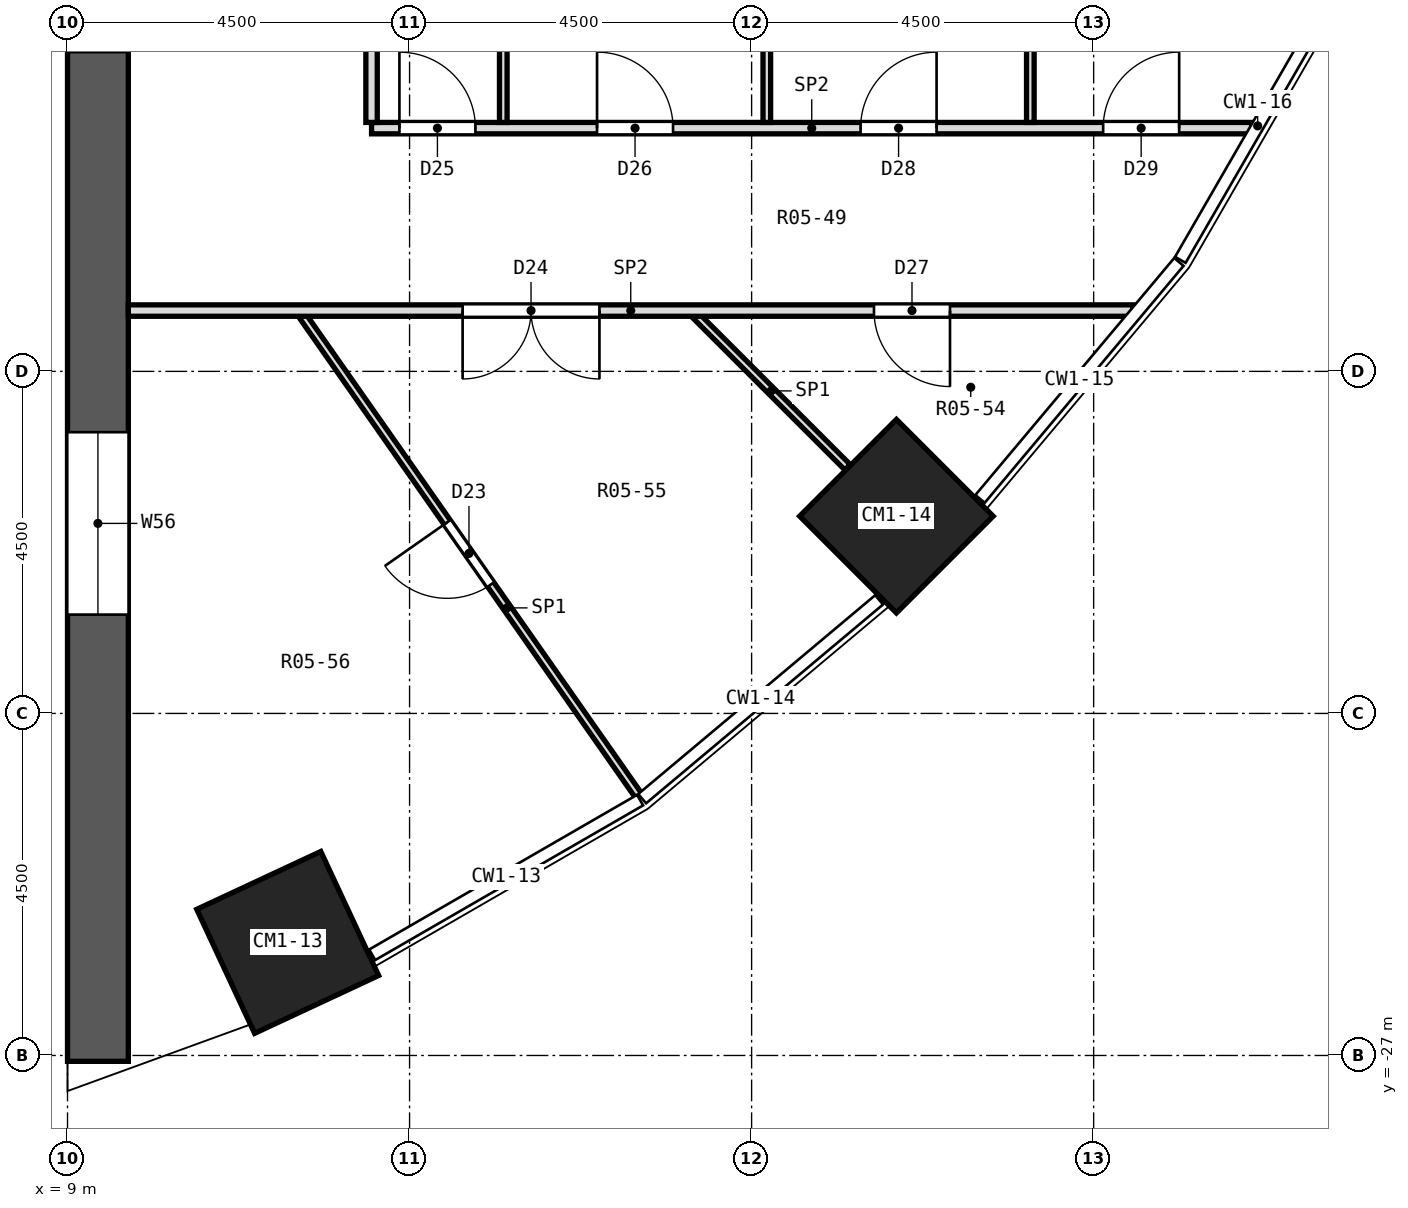
"""IFC4 building model, lengths in metres.
Left out: names, types, materials, properties, quantities, classifications, styles, units other than length and angle.
Written with IfcOpenShell. Run it as: python <this file> out.ifc"""

import sys

from ifc_helpers import new_model, si_unit, direction, frame, frame_2d, origin, origin_2d, place, context, subcontext, project, spatial, polyline, rectangle, outline, extrude, element, fill, save


model = new_model("IFC4")
c1 = context("Model", 3, precision=1e-05, world=origin(), true_north=direction((0.0, 1.0)))
c2 = subcontext(c1, "Body", "Model", "MODEL_VIEW")
j1 = project(units=[si_unit("LENGTHUNIT", "METRE"), si_unit("PLANEANGLEUNIT", "RADIAN")], contexts=[c1])
p1 = place(None, origin())
s1 = spatial("IfcSite", under=j1, at=p1, CompositionType="ELEMENT")
p2 = place(p1, origin())
s2 = spatial("IfcBuilding", under=s1, at=p2, CompositionType="ELEMENT")
p3 = place(p2, frame((0.0, 0.0, 9.2)))
s3 = spatial("IfcBuildingStorey", under=s2, at=p3, CompositionType="ELEMENT", Elevation=9.2)
for number, where, z_axis, x_axis in (
    (1, (11.897, -25.512, 0.0), (0.0, 0.0, 1.0), (0.423, -0.906, 0.0)),
    (2, (19.905, -19.905, 0.0), (0.0, 0.0, 1.0), (0.707, -0.707, 0.0)),
):
    element("IfcColumn", number, at=place(p3, frame(where, z_axis=z_axis, x_axis=x_axis)), inside=s3, PredefinedType="COLUMN", context=c2, shape_type="SweptSolid", body=[
        extrude(rectangle(XDim=1.8, YDim=1.8, at=origin_2d()), origin(), (0.0, 0.0, 1.0), 4.2),
    ])
p4 = place(p3, frame((9.4, -27.077, 0.0), z_axis=(0.0, 0.0, 1.0), x_axis=(0.0, 1.0, 0.0)))
e3 = element("IfcWall", 3, at=p4, inside=s3, PredefinedType="SHEAR", context=c2, shape_type="SweptSolid", body=[
    extrude(rectangle(XDim=54.154, YDim=0.8, at=frame_2d((27.077, 0.0))), origin(), (0.0, 0.0, 1.0), 4.2),
])
p5 = place(p4, frame((13.277, 0.0, 0.9)))
e4 = element("IfcOpeningElement", 4, at=p5, cuts=e3, PredefinedType="OPENING", context=c2, shape_type="SweptSolid", body=[
    extrude(rectangle(XDim=2.4, YDim=2.1, at=frame_2d((1.2, 1.05))), frame((0.0, 0.412, 0.0), z_axis=(0.0, -1.0, 0.0), x_axis=(1.0, 0.0, 0.0)), (0.0, 0.0, 1.0), 0.824),
])
p6 = place(p4, frame((17.877, 0.0, 0.9)))
e5 = element("IfcOpeningElement", 5, at=p6, cuts=e3, PredefinedType="OPENING", context=c2, shape_type="SweptSolid", body=[
    extrude(rectangle(XDim=2.4, YDim=2.1, at=frame_2d((1.2, 1.05))), frame((0.0, 0.412, 0.0), z_axis=(0.0, -1.0, 0.0), x_axis=(1.0, 0.0, 0.0)), (0.0, 0.0, 1.0), 0.824),
])
p7 = place(p4, frame((22.477, 0.0, 0.9)))
e6 = element("IfcOpeningElement", 6, at=p7, cuts=e3, PredefinedType="OPENING", context=c2, shape_type="SweptSolid", body=[
    extrude(rectangle(XDim=2.4, YDim=2.1, at=frame_2d((1.2, 1.05))), frame((0.0, 0.412, 0.0), z_axis=(0.0, -1.0, 0.0), x_axis=(1.0, 0.0, 0.0)), (0.0, 0.0, 1.0), 0.824),
])
p8 = place(p4, frame((29.277, 0.0, 0.9)))
e7 = element("IfcOpeningElement", 7, at=p8, cuts=e3, PredefinedType="OPENING", context=c2, shape_type="SweptSolid", body=[
    extrude(rectangle(XDim=2.4, YDim=2.1, at=frame_2d((1.2, 1.05))), frame((0.0, 0.412, 0.0), z_axis=(0.0, -1.0, 0.0), x_axis=(1.0, 0.0, 0.0)), (0.0, 0.0, 1.0), 0.824),
])
p9 = place(p4, frame((33.877, 0.0, 0.9)))
e8 = element("IfcOpeningElement", 8, at=p9, cuts=e3, PredefinedType="OPENING", context=c2, shape_type="SweptSolid", body=[
    extrude(rectangle(XDim=2.4, YDim=2.1, at=frame_2d((1.2, 1.05))), frame((0.0, 0.412, 0.0), z_axis=(0.0, -1.0, 0.0), x_axis=(1.0, 0.0, 0.0)), (0.0, 0.0, 1.0), 0.824),
])
p10 = place(p4, frame((38.477, 0.0, 0.9)))
e9 = element("IfcOpeningElement", 9, at=p10, cuts=e3, PredefinedType="OPENING", context=c2, shape_type="SweptSolid", body=[
    extrude(rectangle(XDim=2.4, YDim=2.1, at=frame_2d((1.2, 1.05))), frame((0.0, 0.412, 0.0), z_axis=(0.0, -1.0, 0.0), x_axis=(1.0, 0.0, 0.0)), (0.0, 0.0, 1.0), 0.824),
])
p11 = place(p4, frame((5.877, 0.0, 0.9)))
e10 = element("IfcOpeningElement", 10, at=p11, cuts=e3, PredefinedType="OPENING", context=c2, shape_type="SweptSolid", body=[
    extrude(rectangle(XDim=2.4, YDim=2.1, at=frame_2d((1.2, 1.05))), frame((0.0, 0.412, 0.0), z_axis=(0.0, -1.0, 0.0), x_axis=(1.0, 0.0, 0.0)), (0.0, 0.0, 1.0), 0.824),
])
p12 = place(p4, frame((45.877, 0.0, 0.9)))
e11 = element("IfcOpeningElement", 11, at=p12, cuts=e3, PredefinedType="OPENING", context=c2, shape_type="SweptSolid", body=[
    extrude(rectangle(XDim=2.4, YDim=2.1, at=frame_2d((1.2, 1.05))), frame((0.0, 0.412, 0.0), z_axis=(0.0, -1.0, 0.0), x_axis=(1.0, 0.0, 0.0)), (0.0, 0.0, 1.0), 0.824),
])
p13 = place(p3, frame((11.634, -26.49, 0.0), z_axis=(0.342078632434, -0.939669193197, 0.002004142629), x_axis=(-0.939671080385, -0.342079319292, 7.3534e-08)))
e12 = element("IfcWall", 12, at=p13, inside=s3, PredefinedType="SOLIDWALL", context=c2, shape_type="SweptSolid", body=[
    extrude(outline(polyline([(0.0, 0.0), (1.949, -2.168e-19), (2.015, -0.343), (2.328, -1.495), (2.727, -2.622), (3.211, -3.719), (3.467, -4.2), (2.81, -4.2), (2.81, -3.65), (-4.405e-05, -3.65), (0.0, 0.0)])), origin(), (0.0, 0.0, -1.0), 0.38),
])
p14 = place(p3, frame((12.087, -17.261, 0.0), z_axis=(0.0, 0.0, 1.0), x_axis=(0.573585327229, -0.819145818758, 0.0)))
e13 = element("IfcWall", 13, at=p14, inside=s3, PredefinedType="PARTITIONING", context=c2, shape_type="SweptSolid", body=[
    extrude(rectangle(XDim=7.727, YDim=0.1, at=frame_2d((3.864, 0.0))), origin(), (0.0, 0.0, 1.0), 3.65),
])
p15 = place(p14, frame((3.326, 0.0, 0.0)))
e14 = element("IfcOpeningElement", 14, at=p15, cuts=e13, PredefinedType="OPENING", context=c2, shape_type="SweptSolid", body=[
    extrude(rectangle(XDim=1.0, YDim=2.1, at=frame_2d((0.5, 1.05))), frame((0.0, 0.062, 0.0), z_axis=(0.0, -1.0, 0.0), x_axis=(1.0, 0.0, 0.0)), (0.0, 0.0, 1.0), 0.124),
])
p16 = place(p3, frame((17.253, -17.253, 0.0), z_axis=(0.0, 0.0, 1.0), x_axis=(0.707321609299, -0.706891887787, 0.0)))
e15 = element("IfcWall", 15, at=p16, inside=s3, PredefinedType="PARTITIONING", context=c2, shape_type="SweptSolid", body=[
    extrude(rectangle(XDim=2.841, YDim=0.1, at=frame_2d((1.42, 0.0))), origin(), (0.0, 0.0, 1.0), 3.65),
])
p17 = place(p3, frame((9.8, -17.2, 0.0), z_axis=(0.0, 0.0, 1.0), x_axis=(1.0, 0.0, 0.0)))
e16 = element("IfcWall", 16, at=p17, inside=s3, PredefinedType="PARTITIONING", context=c2, shape_type="SweptSolid", body=[
    extrude(rectangle(XDim=13.22, YDim=0.15, at=frame_2d((6.61, 0.0))), origin(), (0.0, 0.0, 1.0), 3.65),
])
p18 = place(p17, frame((4.398, 0.0, 0.0)))
e17 = element("IfcOpeningElement", 17, at=p18, cuts=e16, PredefinedType="OPENING", context=c2, shape_type="SweptSolid", body=[
    extrude(rectangle(XDim=1.8, YDim=2.1, at=frame_2d((0.9, 1.05))), frame((0.0, 0.087, 0.0), z_axis=(0.0, -1.0, 0.0), x_axis=(1.0, 0.0, 0.0)), (0.0, 0.0, 1.0), 0.174),
])
p19 = place(p17, frame((9.81, 0.0, 0.0)))
e18 = element("IfcOpeningElement", 18, at=p19, cuts=e16, PredefinedType="OPENING", context=c2, shape_type="SweptSolid", body=[
    extrude(rectangle(XDim=1.0, YDim=2.1, at=frame_2d((0.5, 1.05))), frame((0.0, 0.087, 0.0), z_axis=(0.0, -1.0, 0.0), x_axis=(1.0, 0.0, 0.0)), (0.0, 0.0, 1.0), 0.174),
])
p20 = place(p3, frame((13.0, -14.8, 0.0), z_axis=(0.0, 0.0, 1.0), x_axis=(1.0, 0.0, 0.0)))
e19 = element("IfcWall", 19, at=p20, inside=s3, PredefinedType="PARTITIONING", context=c2, shape_type="SweptSolid", body=[
    extrude(rectangle(XDim=11.583, YDim=0.15, at=frame_2d((5.792, 0.0))), origin(), (0.0, 0.0, 1.0), 3.65),
])
p21 = place(p20, frame((0.366, 0.0, 0.0)))
e20 = element("IfcOpeningElement", 20, at=p21, cuts=e19, PredefinedType="OPENING", context=c2, shape_type="SweptSolid", body=[
    extrude(rectangle(XDim=1.0, YDim=2.1, at=frame_2d((0.5, 1.05))), frame((0.0, 0.087, 0.0), z_axis=(0.0, -1.0, 0.0), x_axis=(1.0, 0.0, 0.0)), (0.0, 0.0, 1.0), 0.174),
])
p22 = place(p20, frame((2.967, 0.0, 0.0)))
e21 = element("IfcOpeningElement", 21, at=p22, cuts=e19, PredefinedType="OPENING", context=c2, shape_type="SweptSolid", body=[
    extrude(rectangle(XDim=1.0, YDim=2.1, at=frame_2d((0.5, 1.05))), frame((0.0, 0.087, 0.0), z_axis=(0.0, -1.0, 0.0), x_axis=(1.0, 0.0, 0.0)), (0.0, 0.0, 1.0), 0.174),
])
p23 = place(p20, frame((6.434, 0.0, 0.0)))
e22 = element("IfcOpeningElement", 22, at=p23, cuts=e19, PredefinedType="OPENING", context=c2, shape_type="SweptSolid", body=[
    extrude(rectangle(XDim=1.0, YDim=2.1, at=frame_2d((0.5, 1.05))), frame((0.0, 0.087, 0.0), z_axis=(0.0, -1.0, 0.0), x_axis=(1.0, 0.0, 0.0)), (0.0, 0.0, 1.0), 0.174),
])
p24 = place(p20, frame((9.625, 0.0, 0.0)))
e23 = element("IfcOpeningElement", 23, at=p24, cuts=e19, PredefinedType="OPENING", context=c2, shape_type="SweptSolid", body=[
    extrude(rectangle(XDim=1.0, YDim=2.1, at=frame_2d((0.5, 1.05))), frame((0.0, 0.087, 0.0), z_axis=(0.0, -1.0, 0.0), x_axis=(1.0, 0.0, 0.0)), (0.0, 0.0, 1.0), 0.174),
])
for number, where, z_axis, x_axis in (
    (24, (21.667, -14.725, 0.0), (0.0, 0.0, 1.0), (0.0, 1.0, 0.0)),
    (25, (18.2, -14.725, 0.0), (0.0, 0.0, 1.0), (0.0, 1.0, 0.0)),
    (26, (14.733, -14.725, 0.0), (0.0, 0.0, 1.0), (0.0, 1.0, 0.0)),
):
    element("IfcWall", number, at=place(p3, frame(where, z_axis=z_axis, x_axis=x_axis)), inside=s3, PredefinedType="PARTITIONING", context=c2, shape_type="SweptSolid", body=[
        extrude(rectangle(XDim=5.225, YDim=0.1, at=frame_2d((2.613, 0.0))), origin(), (0.0, 0.0, 1.0), 3.65),
    ])
p25 = place(p3, frame((13.0, -14.725, 0.0), z_axis=(0.0, 0.0, 1.0), x_axis=(0.0, 1.0, 0.0)))
e27 = element("IfcWall", 27, at=p25, inside=s3, PredefinedType="PARTITIONING", context=c2, shape_type="SweptSolid", body=[
    extrude(rectangle(XDim=5.225, YDim=0.15, at=frame_2d((2.613, 0.0))), origin(), (0.0, 0.0, 1.0), 3.65),
])
p26 = place(p15, frame((1.0, 0.0, 0.0), z_axis=(0.0, 0.0, 1.0), x_axis=(-1.0, 0.0, 0.0)))
e28 = element("IfcDoor", 28, at=p26, inside=s3, OperationType="SINGLE_SWING_RIGHT", PredefinedType="DOOR", context=c2, shape_type="SweptSolid", body=[
    extrude(rectangle(XDim=1.0, YDim=2.1, at=frame_2d((0.5, 1.05))), frame((0.0, 0.025, 0.0), z_axis=(0.0, -1.0, 0.0), x_axis=(1.0, 0.0, 0.0)), (0.0, 0.0, 1.0), 0.05),
])
fill(e14, e28)
p27 = place(p18, frame((1.8, 0.0, 0.0), z_axis=(0.0, 0.0, 1.0), x_axis=(-1.0, 0.0, 0.0)))
e29 = element("IfcDoor", 29, at=p27, inside=s3, OperationType="DOUBLE_DOOR_SINGLE_SWING", PredefinedType="DOOR", context=c2, shape_type="SweptSolid", body=[
    extrude(rectangle(XDim=1.8, YDim=2.1, at=frame_2d((0.9, 1.05))), frame((0.0, 0.025, 0.0), z_axis=(0.0, -1.0, 0.0), x_axis=(1.0, 0.0, 0.0)), (0.0, 0.0, 1.0), 0.05),
])
fill(e17, e29)
p28 = place(p21, origin())
e30 = element("IfcDoor", 30, at=p28, inside=s3, OperationType="SINGLE_SWING_LEFT", PredefinedType="DOOR", context=c2, shape_type="SweptSolid", body=[
    extrude(rectangle(XDim=1.0, YDim=2.1, at=frame_2d((0.5, 1.05))), frame((0.0, 0.025, 0.0), z_axis=(0.0, -1.0, 0.0), x_axis=(1.0, 0.0, 0.0)), (0.0, 0.0, 1.0), 0.05),
])
fill(e20, e30)
p29 = place(p22, origin())
e31 = element("IfcDoor", 31, at=p29, inside=s3, OperationType="SINGLE_SWING_LEFT", PredefinedType="DOOR", context=c2, shape_type="SweptSolid", body=[
    extrude(rectangle(XDim=1.0, YDim=2.1, at=frame_2d((0.5, 1.05))), frame((0.0, 0.025, 0.0), z_axis=(0.0, -1.0, 0.0), x_axis=(1.0, 0.0, 0.0)), (0.0, 0.0, 1.0), 0.05),
])
fill(e21, e31)
p30 = place(p19, frame((1.0, 0.0, 0.0), z_axis=(0.0, 0.0, 1.0), x_axis=(-1.0, 0.0, 0.0)))
e32 = element("IfcDoor", 32, at=p30, inside=s3, OperationType="SINGLE_SWING_LEFT", PredefinedType="DOOR", context=c2, shape_type="SweptSolid", body=[
    extrude(rectangle(XDim=1.0, YDim=2.1, at=frame_2d((0.5, 1.05))), frame((0.0, 0.025, 0.0), z_axis=(0.0, -1.0, 0.0), x_axis=(1.0, 0.0, 0.0)), (0.0, 0.0, 1.0), 0.05),
])
fill(e18, e32)
p31 = place(p23, origin())
e33 = element("IfcDoor", 33, at=p31, inside=s3, OperationType="SINGLE_SWING_RIGHT", PredefinedType="DOOR", context=c2, shape_type="SweptSolid", body=[
    extrude(rectangle(XDim=1.0, YDim=2.1, at=frame_2d((0.5, 1.05))), frame((0.0, 0.025, 0.0), z_axis=(0.0, -1.0, 0.0), x_axis=(1.0, 0.0, 0.0)), (0.0, 0.0, 1.0), 0.05),
])
fill(e22, e33)
p32 = place(p24, origin())
e34 = element("IfcDoor", 34, at=p32, inside=s3, OperationType="SINGLE_SWING_RIGHT", PredefinedType="DOOR", context=c2, shape_type="SweptSolid", body=[
    extrude(rectangle(XDim=1.0, YDim=2.1, at=frame_2d((0.5, 1.05))), frame((0.0, 0.025, 0.0), z_axis=(0.0, -1.0, 0.0), x_axis=(1.0, 0.0, 0.0)), (0.0, 0.0, 1.0), 0.05),
])
fill(e23, e34)
p33 = place(p11, origin())
e35 = element("IfcWindow", 35, at=p33, inside=s3, PartitioningType="SINGLE_PANEL", PredefinedType="WINDOW", context=c2, shape_type="SweptSolid", body=[
    extrude(rectangle(XDim=2.4, YDim=2.1, at=frame_2d((1.2, 1.05))), frame((0.0, 0.03, 0.0), z_axis=(0.0, -1.0, 0.0), x_axis=(1.0, 0.0, 0.0)), (0.0, 0.0, 1.0), 0.06),
])
fill(e10, e35)
save(model, sys.argv[1])
